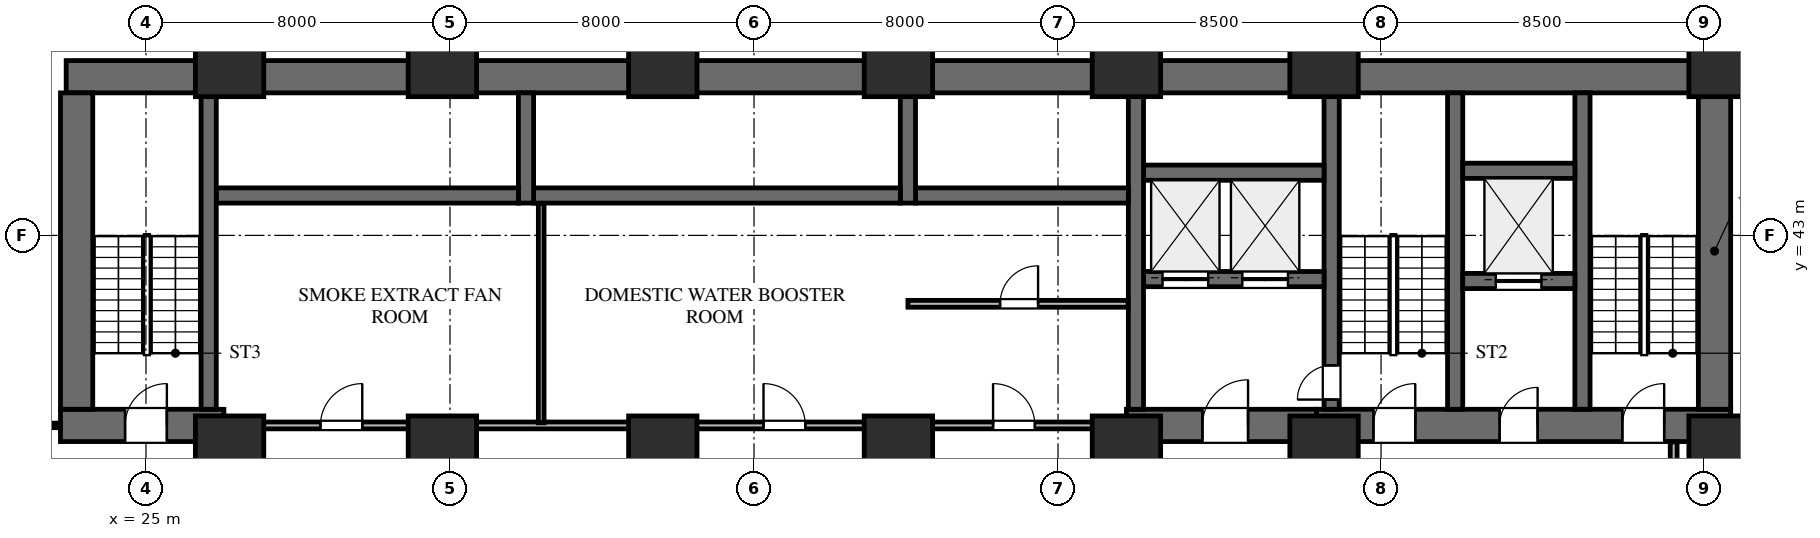
"""IFC4 building model, lengths in metres.
Left out: names, types, materials, properties, quantities, classifications, styles, units other than length and angle.
Written with IfcOpenShell. Run it as: python <this file> out.ifc"""

import sys

from ifc_helpers import new_model, si_unit, direction, frame, frame_2d, origin, origin_2d, place, context, subcontext, project, spatial, rectangle, extrude, element, fill, save


model = new_model("IFC4")
c1 = context("Model", 3, precision=1e-05, world=origin(), true_north=direction((0.0, 1.0)))
c2 = subcontext(c1, "Body", "Model", "MODEL_VIEW")
j1 = project(units=[si_unit("LENGTHUNIT", "METRE"), si_unit("PLANEANGLEUNIT", "RADIAN")], contexts=[c1])
p1 = place(None, origin())
s1 = spatial("IfcSite", under=j1, at=p1, CompositionType="ELEMENT")
p2 = place(p1, origin())
s2 = spatial("IfcBuilding", under=s1, at=p2, CompositionType="ELEMENT")
p3 = place(p2, frame((0.0, 0.0, -8.4)))
s3 = spatial("IfcBuildingStorey", under=s2, at=p3, CompositionType="ELEMENT", Elevation=-8.4)
p4 = place(p3, frame((22.9, 47.175, 0.0), z_axis=(0.0, 0.0, 1.0), x_axis=(1.0, 0.0, 0.0)))
e1 = element("IfcWall", 1, at=p4, inside=s3, PredefinedType="SHEAR", context=c2, shape_type="SweptSolid", body=[
    extrude(rectangle(XDim=43.8, YDim=0.85, at=frame_2d((21.9, 0.0))), origin(), (0.0, 0.0, 1.0), 4.2),
])
p5 = place(p3, frame((55.8, 38.0, 0.0), z_axis=(0.0, 0.0, 1.0), x_axis=(1.0, 0.0, 0.0)))
e2 = element("IfcWall", 2, at=p5, inside=s3, PredefinedType="SHEAR", context=c2, shape_type="SweptSolid", body=[
    extrude(rectangle(XDim=10.9, YDim=0.85, at=frame_2d((5.45, 0.0))), origin(), (0.0, 0.0, 1.0), 4.2),
])
p6 = place(p5, frame((1.5, 0.0, 0.0)))
e3 = element("IfcOpeningElement", 3, at=p6, cuts=e2, PredefinedType="OPENING", context=c2, shape_type="SweptSolid", body=[
    extrude(rectangle(XDim=1.1, YDim=2.2, at=frame_2d((0.55, 1.1))), frame((0.0, 0.435, 0.0), z_axis=(0.0, -1.0, 0.0), x_axis=(1.0, 0.0, 0.0)), (0.0, 0.0, 1.0), 0.87),
])
p7 = place(p5, frame((4.82, 0.0, 0.0)))
e4 = element("IfcOpeningElement", 4, at=p7, cuts=e2, PredefinedType="OPENING", context=c2, shape_type="SweptSolid", body=[
    extrude(rectangle(XDim=1.0, YDim=2.15, at=frame_2d((0.5, 1.075))), frame((0.0, 0.435, 0.0), z_axis=(0.0, -1.0, 0.0), x_axis=(1.0, 0.0, 0.0)), (0.0, 0.0, 1.0), 0.87),
])
p8 = place(p5, frame((8.05, 0.0, 0.0)))
e5 = element("IfcOpeningElement", 5, at=p8, cuts=e2, PredefinedType="OPENING", context=c2, shape_type="SweptSolid", body=[
    extrude(rectangle(XDim=1.1, YDim=2.2, at=frame_2d((0.55, 1.1))), frame((0.0, 0.435, 0.0), z_axis=(0.0, -1.0, 0.0), x_axis=(1.0, 0.0, 0.0)), (0.0, 0.0, 1.0), 0.87),
])
p9 = place(p3, frame((66.275, 38.425, 0.0), z_axis=(0.0, 0.0, 1.0), x_axis=(0.0, 1.0, 0.0)))
e6 = element("IfcWall", 6, at=p9, inside=s3, PredefinedType="SHEAR", context=c2, shape_type="SweptSolid", body=[
    extrude(rectangle(XDim=8.325, YDim=0.85, at=frame_2d((4.163, 0.0))), origin(), (0.0, 0.0, 1.0), 4.2),
])
for number, where, z_axis, x_axis in (
    (7, (62.8, 38.425, 0.0), (0.0, 0.0, 1.0), (0.0, 1.0, 0.0)),
    (8, (59.45, 38.425, 0.0), (0.0, 0.0, 1.0), (0.0, 1.0, 0.0)),
):
    element("IfcWall", number, at=place(p3, frame(where, z_axis=z_axis, x_axis=x_axis)), inside=s3, PredefinedType="SHEAR", context=c2, shape_type="SweptSolid", body=[
        extrude(rectangle(XDim=8.325, YDim=0.4, at=frame_2d((4.163, 0.0))), origin(), (0.0, 0.0, 1.0), 4.2),
    ])
p10 = place(p3, frame((56.2, 38.425, 0.0), z_axis=(0.0, 0.0, 1.0), x_axis=(0.0, 1.0, 0.0)))
e9 = element("IfcWall", 9, at=p10, inside=s3, PredefinedType="SHEAR", context=c2, shape_type="SweptSolid", body=[
    extrude(rectangle(XDim=8.325, YDim=0.4, at=frame_2d((4.163, 0.0))), origin(), (0.0, 0.0, 1.0), 4.2),
])
p11 = place(p10, frame((0.255, 0.0, 0.0)))
e10 = element("IfcOpeningElement", 10, at=p11, cuts=e9, PredefinedType="OPENING", context=c2, shape_type="SweptSolid", body=[
    extrude(rectangle(XDim=0.9, YDim=2.15, at=frame_2d((0.45, 1.075))), frame((0.0, 0.21, 0.0), z_axis=(0.0, -1.0, 0.0), x_axis=(1.0, 0.0, 0.0)), (0.0, 0.0, 1.0), 0.42),
])
p12 = place(p3, frame((59.65, 41.8, 0.0), z_axis=(0.0, 0.0, 1.0), x_axis=(1.0, 0.0, 0.0)))
e11 = element("IfcWall", 11, at=p12, inside=s3, PredefinedType="SHEAR", context=c2, shape_type="SweptSolid", body=[
    extrude(rectangle(XDim=2.95, YDim=0.4, at=frame_2d((1.475, 0.0))), origin(), (0.0, 0.0, 1.0), 4.2),
])
p13 = place(p12, frame((0.87, 0.0, 0.0)))
e12 = element("IfcOpeningElement", 12, at=p13, cuts=e11, PredefinedType="OPENING", context=c2, shape_type="SweptSolid", body=[
    extrude(rectangle(XDim=1.2, YDim=2.2, at=frame_2d((0.6, 1.1))), frame((0.0, 0.21, 0.0), z_axis=(0.0, -1.0, 0.0), x_axis=(1.0, 0.0, 0.0)), (0.0, 0.0, 1.0), 0.42),
])
p14 = place(p3, frame((59.65, 44.7, 0.0), z_axis=(0.0, 0.0, 1.0), x_axis=(1.0, 0.0, 0.0)))
e13 = element("IfcWall", 13, at=p14, inside=s3, PredefinedType="SHEAR", context=c2, shape_type="SweptSolid", body=[
    extrude(rectangle(XDim=2.95, YDim=0.4, at=frame_2d((1.475, 0.0))), origin(), (0.0, 0.0, 1.0), 4.2),
])
p15 = place(p3, frame((50.8, 38.0, 0.0), z_axis=(0.0, 0.0, 1.0), x_axis=(1.0, 0.0, 0.0)))
e14 = element("IfcWall", 14, at=p15, inside=s3, PredefinedType="SHEAR", context=c2, shape_type="SweptSolid", body=[
    extrude(rectangle(XDim=5.0, YDim=0.85, at=frame_2d((2.5, 0.0))), origin(), (0.0, 0.0, 1.0), 4.2),
])
p16 = place(p15, frame((2.0, 0.0, 0.0)))
e15 = element("IfcOpeningElement", 15, at=p16, cuts=e14, PredefinedType="OPENING", context=c2, shape_type="SweptSolid", body=[
    extrude(rectangle(XDim=1.2, YDim=2.2, at=frame_2d((0.6, 1.1))), frame((0.0, 0.435, 0.0), z_axis=(0.0, -1.0, 0.0), x_axis=(1.0, 0.0, 0.0)), (0.0, 0.0, 1.0), 0.87),
])
p17 = place(p3, frame((51.25, 41.85, 0.0), z_axis=(0.0, 0.0, 1.0), x_axis=(1.0, 0.0, 0.0)))
e16 = element("IfcWall", 16, at=p17, inside=s3, PredefinedType="SHEAR", context=c2, shape_type="SweptSolid", body=[
    extrude(rectangle(XDim=4.75, YDim=0.4, at=frame_2d((2.375, 0.0))), origin(), (0.0, 0.0, 1.0), 4.2),
])
p18 = place(p17, frame((0.5, 0.0, 0.0)))
e17 = element("IfcOpeningElement", 17, at=p18, cuts=e16, PredefinedType="OPENING", context=c2, shape_type="SweptSolid", body=[
    extrude(rectangle(XDim=1.2, YDim=2.2, at=frame_2d((0.6, 1.1))), frame((0.0, 0.21, 0.0), z_axis=(0.0, -1.0, 0.0), x_axis=(1.0, 0.0, 0.0)), (0.0, 0.0, 1.0), 0.42),
])
p19 = place(p17, frame((2.6, 0.0, 0.0)))
e18 = element("IfcOpeningElement", 18, at=p19, cuts=e16, PredefinedType="OPENING", context=c2, shape_type="SweptSolid", body=[
    extrude(rectangle(XDim=1.2, YDim=2.2, at=frame_2d((0.6, 1.1))), frame((0.0, 0.21, 0.0), z_axis=(0.0, -1.0, 0.0), x_axis=(1.0, 0.0, 0.0)), (0.0, 0.0, 1.0), 0.42),
])
p20 = place(p3, frame((51.25, 44.65, 0.0), z_axis=(0.0, 0.0, 1.0), x_axis=(1.0, 0.0, 0.0)))
e19 = element("IfcWall", 19, at=p20, inside=s3, PredefinedType="SHEAR", context=c2, shape_type="SweptSolid", body=[
    extrude(rectangle(XDim=4.75, YDim=0.4, at=frame_2d((2.375, 0.0))), origin(), (0.0, 0.0, 1.0), 4.2),
])
p21 = place(p3, frame((51.05, 38.425, 0.0), z_axis=(0.0, 0.0, 1.0), x_axis=(0.0, 1.0, 0.0)))
e20 = element("IfcWall", 20, at=p21, inside=s3, PredefinedType="SHEAR", context=c2, shape_type="SweptSolid", body=[
    extrude(rectangle(XDim=8.325, YDim=0.4, at=frame_2d((4.163, 0.0))), origin(), (0.0, 0.0, 1.0), 4.2),
])
p22 = place(p3, frame((45.25, 44.05, 0.0), z_axis=(0.0, 0.0, 1.0), x_axis=(1.0, 0.0, 0.0)))
e21 = element("IfcWall", 21, at=p22, inside=s3, PredefinedType="SHEAR", context=c2, shape_type="SweptSolid", body=[
    extrude(rectangle(XDim=5.6, YDim=0.4, at=frame_2d((2.8, 0.0))), origin(), (0.0, 0.0, 1.0), 4.2),
])
p23 = place(p3, frame((45.05, 43.85, 0.0), z_axis=(0.0, 0.0, 1.0), x_axis=(0.0, 1.0, 0.0)))
e22 = element("IfcWall", 22, at=p23, inside=s3, PredefinedType="SHEAR", context=c2, shape_type="SweptSolid", body=[
    extrude(rectangle(XDim=2.9, YDim=0.4, at=frame_2d((1.45, 0.0))), origin(), (0.0, 0.0, 1.0), 4.2),
])
p24 = place(p3, frame((35.2, 44.05, 0.0), z_axis=(0.0, 0.0, 1.0), x_axis=(1.0, 0.0, 0.0)))
e23 = element("IfcWall", 23, at=p24, inside=s3, PredefinedType="SHEAR", context=c2, shape_type="SweptSolid", body=[
    extrude(rectangle(XDim=9.65, YDim=0.4, at=frame_2d((4.825, 0.0))), origin(), (0.0, 0.0, 1.0), 4.2),
])
p25 = place(p3, frame((35.0, 43.85, 0.0), z_axis=(0.0, 0.0, 1.0), x_axis=(0.0, 1.0, 0.0)))
e24 = element("IfcWall", 24, at=p25, inside=s3, PredefinedType="SHEAR", context=c2, shape_type="SweptSolid", body=[
    extrude(rectangle(XDim=2.9, YDim=0.4, at=frame_2d((1.45, 0.0))), origin(), (0.0, 0.0, 1.0), 4.2),
])
p26 = place(p3, frame((26.85, 44.05, 0.0), z_axis=(0.0, 0.0, 1.0), x_axis=(1.0, 0.0, 0.0)))
e25 = element("IfcWall", 25, at=p26, inside=s3, PredefinedType="SHEAR", context=c2, shape_type="SweptSolid", body=[
    extrude(rectangle(XDim=7.95, YDim=0.4, at=frame_2d((3.975, 0.0))), origin(), (0.0, 0.0, 1.0), 4.2),
])
p27 = place(p3, frame((22.75, 38.0, 0.0), z_axis=(0.0, 0.0, 1.0), x_axis=(1.0, 0.0, 0.0)))
e26 = element("IfcWall", 26, at=p27, inside=s3, PredefinedType="SHEAR", context=c2, shape_type="SweptSolid", body=[
    extrude(rectangle(XDim=4.3, YDim=0.85, at=frame_2d((2.15, 0.0))), origin(), (0.0, 0.0, 1.0), 4.2),
])
p28 = place(p27, frame((1.7, 0.0, 0.0)))
e27 = element("IfcOpeningElement", 27, at=p28, cuts=e26, PredefinedType="OPENING", context=c2, shape_type="SweptSolid", body=[
    extrude(rectangle(XDim=1.1, YDim=2.2, at=frame_2d((0.55, 1.1))), frame((0.0, 0.435, 0.0), z_axis=(0.0, -1.0, 0.0), x_axis=(1.0, 0.0, 0.0)), (0.0, 0.0, 1.0), 0.87),
])
p29 = place(p3, frame((23.175, 38.425, 0.0), z_axis=(0.0, 0.0, 1.0), x_axis=(0.0, 1.0, 0.0)))
e28 = element("IfcWall", 28, at=p29, inside=s3, PredefinedType="SHEAR", context=c2, shape_type="SweptSolid", body=[
    extrude(rectangle(XDim=8.325, YDim=0.85, at=frame_2d((4.163, 0.0))), origin(), (0.0, 0.0, 1.0), 4.2),
])
p30 = place(p3, frame((26.65, 38.425, 0.0), z_axis=(0.0, 0.0, 1.0), x_axis=(0.0, 1.0, 0.0)))
e29 = element("IfcWall", 29, at=p30, inside=s3, PredefinedType="SHEAR", context=c2, shape_type="SweptSolid", body=[
    extrude(rectangle(XDim=8.325, YDim=0.4, at=frame_2d((4.163, 0.0))), origin(), (0.0, 0.0, 1.0), 4.2),
])
for number, where, z_axis, x_axis in (
    (30, (66.5, 47.55, 0.0), (0.0, 0.0, 1.0), (1.0, 0.0, 0.0)),
    (31, (56.0, 47.55, 0.0), (0.0, 0.0, 1.0), (1.0, 0.0, 0.0)),
    (32, (66.5, 37.35, 0.0), (0.0, 0.0, 1.0), (1.0, 0.0, 0.0)),
    (33, (56.0, 37.35, 0.0), (0.0, 0.0, 1.0), (1.0, 0.0, 0.0)),
    (34, (50.8, 47.55, 0.0), (0.0, 0.0, 1.0), (1.0, 0.0, 0.0)),
    (35, (50.8, 37.35, 0.0), (0.0, 0.0, 1.0), (1.0, 0.0, 0.0)),
    (36, (44.8, 37.35, 0.0), (0.0, 0.0, 1.0), (1.0, 0.0, 0.0)),
    (37, (44.8, 47.55, 0.0), (0.0, 0.0, 1.0), (1.0, 0.0, 0.0)),
    (38, (38.6, 37.35, 0.0), (0.0, 0.0, 1.0), (1.0, 0.0, 0.0)),
    (39, (38.6, 47.55, 0.0), (0.0, 0.0, 1.0), (1.0, 0.0, 0.0)),
    (40, (32.8, 37.35, 0.0), (0.0, 0.0, 1.0), (1.0, 0.0, 0.0)),
    (41, (32.8, 47.55, 0.0), (0.0, 0.0, 1.0), (1.0, 0.0, 0.0)),
    (42, (27.2, 37.35, 0.0), (0.0, 0.0, 1.0), (1.0, 0.0, 0.0)),
    (43, (27.2, 47.55, 0.0), (0.0, 0.0, 1.0), (1.0, 0.0, 0.0)),
):
    element("IfcColumn", number, at=place(p3, frame(where, z_axis=z_axis, x_axis=x_axis)), inside=s3, PredefinedType="COLUMN", context=c2, shape_type="SweptSolid", body=[
        extrude(rectangle(XDim=1.8, YDim=1.8, at=origin_2d()), origin(), (0.0, 0.0, 1.0), 4.2),
    ])
p31 = place(p3, frame((45.05, 38.0, 0.0), z_axis=(0.0, 0.0, 1.0), x_axis=(1.0, 0.0, 0.0)))
e44 = element("IfcWall", 44, at=p31, inside=s3, PredefinedType="STANDARD", context=c2, shape_type="SweptSolid", body=[
    extrude(rectangle(XDim=5.75, YDim=0.18, at=frame_2d((2.875, 0.0))), origin(), (0.0, 0.0, 1.0), 2.952),
])
p32 = place(p31, frame((2.24, 0.0, 0.0)))
e45 = element("IfcOpeningElement", 45, at=p32, cuts=e44, PredefinedType="OPENING", context=c2, shape_type="SweptSolid", body=[
    extrude(rectangle(XDim=1.1, YDim=2.2, at=frame_2d((0.55, 1.1))), frame((0.0, 0.1, 0.0), z_axis=(0.0, -1.0, 0.0), x_axis=(1.0, 0.0, 0.0)), (0.0, 0.0, 1.0), 0.2),
])
p33 = place(p3, frame((45.05, 41.2, 0.0), z_axis=(0.0, 0.0, 1.0), x_axis=(1.0, 0.0, 0.0)))
e46 = element("IfcWall", 46, at=p33, inside=s3, PredefinedType="STANDARD", context=c2, shape_type="SweptSolid", body=[
    extrude(rectangle(XDim=5.792, YDim=0.18, at=frame_2d((2.896, 0.0))), origin(), (0.0, 0.0, 1.0), 2.952),
])
p34 = place(p33, frame((2.425, 0.0, 0.0)))
e47 = element("IfcOpeningElement", 47, at=p34, cuts=e46, PredefinedType="OPENING", context=c2, shape_type="SweptSolid", body=[
    extrude(rectangle(XDim=1.0, YDim=2.15, at=frame_2d((0.5, 1.075))), frame((0.0, 0.1, 0.0), z_axis=(0.0, -1.0, 0.0), x_axis=(1.0, 0.0, 0.0)), (0.0, 0.0, 1.0), 0.2),
])
p35 = place(p3, frame((27.05, 38.0, 0.0), z_axis=(0.0, 0.0, 1.0), x_axis=(1.0, 0.0, 0.0)))
e48 = element("IfcWall", 48, at=p35, inside=s3, PredefinedType="STANDARD", context=c2, shape_type="SweptSolid", body=[
    extrude(rectangle(XDim=18.0, YDim=0.18, at=frame_2d((9.0, 0.0))), origin(), (0.0, 0.0, 1.0), 2.952),
])
p36 = place(p35, frame((2.541, 0.0, 0.0)))
e49 = element("IfcOpeningElement", 49, at=p36, cuts=e48, PredefinedType="OPENING", context=c2, shape_type="SweptSolid", body=[
    extrude(rectangle(XDim=1.1, YDim=2.2, at=frame_2d((0.55, 1.1))), frame((0.0, 0.1, 0.0), z_axis=(0.0, -1.0, 0.0), x_axis=(1.0, 0.0, 0.0)), (0.0, 0.0, 1.0), 0.2),
])
p37 = place(p35, frame((14.2, 0.0, 0.0)))
e50 = element("IfcOpeningElement", 50, at=p37, cuts=e48, PredefinedType="OPENING", context=c2, shape_type="SweptSolid", body=[
    extrude(rectangle(XDim=1.1, YDim=2.2, at=frame_2d((0.55, 1.1))), frame((0.0, 0.1, 0.0), z_axis=(0.0, -1.0, 0.0), x_axis=(1.0, 0.0, 0.0)), (0.0, 0.0, 1.0), 0.2),
])
p38 = place(p3, frame((35.4, 38.068, 0.0), z_axis=(0.0, 0.0, 1.0), x_axis=(0.0, 1.0, 0.0)))
e51 = element("IfcWall", 51, at=p38, inside=s3, PredefinedType="PARTITIONING", context=c2, shape_type="SweptSolid", body=[
    extrude(rectangle(XDim=5.774, YDim=0.15, at=frame_2d((2.887, 0.0))), origin(), (0.0, 0.0, 1.0), 3.9),
])
p39 = place(p3, frame((65.2, 34.4, 0.0), z_axis=(0.0, 0.0, 1.0), x_axis=(0.0, 1.0, 0.0)))
e52 = element("IfcWall", 52, at=p39, inside=s3, PredefinedType="STANDARD", context=c2, shape_type="SweptSolid", body=[
    extrude(rectangle(XDim=3.167, YDim=0.18, at=frame_2d((1.583, 0.0))), origin(), (0.0, 0.0, 1.0), 2.952),
])
p40 = place(p3, frame((8.3, 38.0, 0.0), z_axis=(0.0, 0.0, 1.0), x_axis=(1.0, 0.0, 0.0)))
e53 = element("IfcWall", 53, at=p40, inside=s3, PredefinedType="PARTITIONING", context=c2, shape_type="SweptSolid", body=[
    extrude(rectangle(XDim=14.45, YDim=0.12, at=frame_2d((7.225, 0.0))), origin(), (0.0, 0.0, 1.0), 2.952),
])
p41 = place(p40, frame((1.482, 0.0, 0.0)))
e54 = element("IfcOpeningElement", 54, at=p41, cuts=e53, PredefinedType="OPENING", context=c2, shape_type="SweptSolid", body=[
    extrude(rectangle(XDim=0.95, YDim=2.15, at=frame_2d((0.475, 1.075))), frame((0.0, 0.07, 0.0), z_axis=(0.0, -1.0, 0.0), x_axis=(1.0, 0.0, 0.0)), (0.0, 0.0, 1.0), 0.14),
])
p42 = place(p40, frame((5.385, 0.0, 0.0)))
e55 = element("IfcOpeningElement", 55, at=p42, cuts=e53, PredefinedType="OPENING", context=c2, shape_type="SweptSolid", body=[
    extrude(rectangle(XDim=0.95, YDim=2.15, at=frame_2d((0.475, 1.075))), frame((0.0, 0.07, 0.0), z_axis=(0.0, -1.0, 0.0), x_axis=(1.0, 0.0, 0.0)), (0.0, 0.0, 1.0), 0.14),
])
p43 = place(p40, frame((11.52, 0.0, 0.0)))
e56 = element("IfcOpeningElement", 56, at=p43, cuts=e53, PredefinedType="OPENING", context=c2, shape_type="SweptSolid", body=[
    extrude(rectangle(XDim=0.95, YDim=2.15, at=frame_2d((0.475, 1.075))), frame((0.0, 0.07, 0.0), z_axis=(0.0, -1.0, 0.0), x_axis=(1.0, 0.0, 0.0)), (0.0, 0.0, 1.0), 0.14),
])
p44 = place(p6, origin())
e57 = element("IfcDoor", 57, at=p44, inside=s3, OperationType="SINGLE_SWING_RIGHT", PredefinedType="DOOR", context=c2, shape_type="SweptSolid", body=[
    extrude(rectangle(XDim=1.1, YDim=2.2, at=frame_2d((0.55, 1.1))), frame((0.0, 0.025, 0.0), z_axis=(0.0, -1.0, 0.0), x_axis=(1.0, 0.0, 0.0)), (0.0, 0.0, 1.0), 0.05),
])
fill(e3, e57)
p45 = place(p7, origin())
e58 = element("IfcDoor", 58, at=p45, inside=s3, OperationType="SINGLE_SWING_RIGHT", PredefinedType="DOOR", context=c2, shape_type="SweptSolid", body=[
    extrude(rectangle(XDim=1.0, YDim=2.15, at=frame_2d((0.5, 1.075))), frame((0.0, 0.025, 0.0), z_axis=(0.0, -1.0, 0.0), x_axis=(1.0, 0.0, 0.0)), (0.0, 0.0, 1.0), 0.05),
])
fill(e4, e58)
p46 = place(p8, origin())
e59 = element("IfcDoor", 59, at=p46, inside=s3, OperationType="SINGLE_SWING_RIGHT", PredefinedType="DOOR", context=c2, shape_type="SweptSolid", body=[
    extrude(rectangle(XDim=1.1, YDim=2.2, at=frame_2d((0.55, 1.1))), frame((0.0, 0.025, 0.0), z_axis=(0.0, -1.0, 0.0), x_axis=(1.0, 0.0, 0.0)), (0.0, 0.0, 1.0), 0.05),
])
fill(e5, e59)
p47 = place(p16, origin())
e60 = element("IfcDoor", 60, at=p47, inside=s3, OperationType="SINGLE_SWING_RIGHT", PredefinedType="DOOR", context=c2, shape_type="SweptSolid", body=[
    extrude(rectangle(XDim=1.2, YDim=2.2, at=frame_2d((0.6, 1.1))), frame((0.0, 0.025, 0.0), z_axis=(0.0, -1.0, 0.0), x_axis=(1.0, 0.0, 0.0)), (0.0, 0.0, 1.0), 0.05),
])
fill(e15, e60)
p48 = place(p11, origin())
e61 = element("IfcDoor", 61, at=p48, inside=s3, OperationType="SINGLE_SWING_LEFT", PredefinedType="DOOR", context=c2, shape_type="SweptSolid", body=[
    extrude(rectangle(XDim=0.9, YDim=2.15, at=frame_2d((0.45, 1.075))), frame((0.0, 0.025, 0.0), z_axis=(0.0, -1.0, 0.0), x_axis=(1.0, 0.0, 0.0)), (0.0, 0.0, 1.0), 0.05),
])
fill(e10, e61)
p49 = place(p28, origin())
e62 = element("IfcDoor", 62, at=p49, inside=s3, OperationType="SINGLE_SWING_RIGHT", PredefinedType="DOOR", context=c2, shape_type="SweptSolid", body=[
    extrude(rectangle(XDim=1.1, YDim=2.2, at=frame_2d((0.55, 1.1))), frame((0.0, 0.025, 0.0), z_axis=(0.0, -1.0, 0.0), x_axis=(1.0, 0.0, 0.0)), (0.0, 0.0, 1.0), 0.05),
])
fill(e27, e62)
p50 = place(p18, origin())
e63 = element("IfcDoor", 63, at=p50, inside=s3, OperationType="DOUBLE_DOOR_SLIDING", PredefinedType="DOOR", context=c2, shape_type="SweptSolid", body=[
    extrude(rectangle(XDim=1.2, YDim=2.2, at=frame_2d((0.6, 1.1))), frame((0.0, 0.025, 0.0), z_axis=(0.0, -1.0, 0.0), x_axis=(1.0, 0.0, 0.0)), (0.0, 0.0, 1.0), 0.05),
])
fill(e17, e63)
p51 = place(p19, origin())
e64 = element("IfcDoor", 64, at=p51, inside=s3, OperationType="DOUBLE_DOOR_SLIDING", PredefinedType="DOOR", context=c2, shape_type="SweptSolid", body=[
    extrude(rectangle(XDim=1.2, YDim=2.2, at=frame_2d((0.6, 1.1))), frame((0.0, 0.025, 0.0), z_axis=(0.0, -1.0, 0.0), x_axis=(1.0, 0.0, 0.0)), (0.0, 0.0, 1.0), 0.05),
])
fill(e18, e64)
p52 = place(p13, origin())
e65 = element("IfcDoor", 65, at=p52, inside=s3, OperationType="DOUBLE_DOOR_SLIDING", PredefinedType="DOOR", context=c2, shape_type="SweptSolid", body=[
    extrude(rectangle(XDim=1.2, YDim=2.2, at=frame_2d((0.6, 1.1))), frame((0.0, 0.025, 0.0), z_axis=(0.0, -1.0, 0.0), x_axis=(1.0, 0.0, 0.0)), (0.0, 0.0, 1.0), 0.05),
])
fill(e12, e65)
p53 = place(p34, origin())
e66 = element("IfcDoor", 66, at=p53, inside=s3, OperationType="SINGLE_SWING_RIGHT", PredefinedType="DOOR", context=c2, shape_type="SweptSolid", body=[
    extrude(rectangle(XDim=1.0, YDim=2.15, at=frame_2d((0.5, 1.075))), frame((0.0, 0.025, 0.0), z_axis=(0.0, -1.0, 0.0), x_axis=(1.0, 0.0, 0.0)), (0.0, 0.0, 1.0), 0.05),
])
fill(e47, e66)
p54 = place(p32, origin())
e67 = element("IfcDoor", 67, at=p54, inside=s3, OperationType="SINGLE_SWING_LEFT", PredefinedType="DOOR", context=c2, shape_type="SweptSolid", body=[
    extrude(rectangle(XDim=1.1, YDim=2.2, at=frame_2d((0.55, 1.1))), frame((0.0, 0.025, 0.0), z_axis=(0.0, -1.0, 0.0), x_axis=(1.0, 0.0, 0.0)), (0.0, 0.0, 1.0), 0.05),
])
fill(e45, e67)
p55 = place(p36, origin())
e68 = element("IfcDoor", 68, at=p55, inside=s3, OperationType="SINGLE_SWING_RIGHT", PredefinedType="DOOR", context=c2, shape_type="SweptSolid", body=[
    extrude(rectangle(XDim=1.1, YDim=2.2, at=frame_2d((0.55, 1.1))), frame((0.0, 0.025, 0.0), z_axis=(0.0, -1.0, 0.0), x_axis=(1.0, 0.0, 0.0)), (0.0, 0.0, 1.0), 0.05),
])
fill(e49, e68)
p56 = place(p37, origin())
e69 = element("IfcDoor", 69, at=p56, inside=s3, OperationType="SINGLE_SWING_LEFT", PredefinedType="DOOR", context=c2, shape_type="SweptSolid", body=[
    extrude(rectangle(XDim=1.1, YDim=2.2, at=frame_2d((0.55, 1.1))), frame((0.0, 0.025, 0.0), z_axis=(0.0, -1.0, 0.0), x_axis=(1.0, 0.0, 0.0)), (0.0, 0.0, 1.0), 0.05),
])
fill(e50, e69)
save(model, sys.argv[1])
